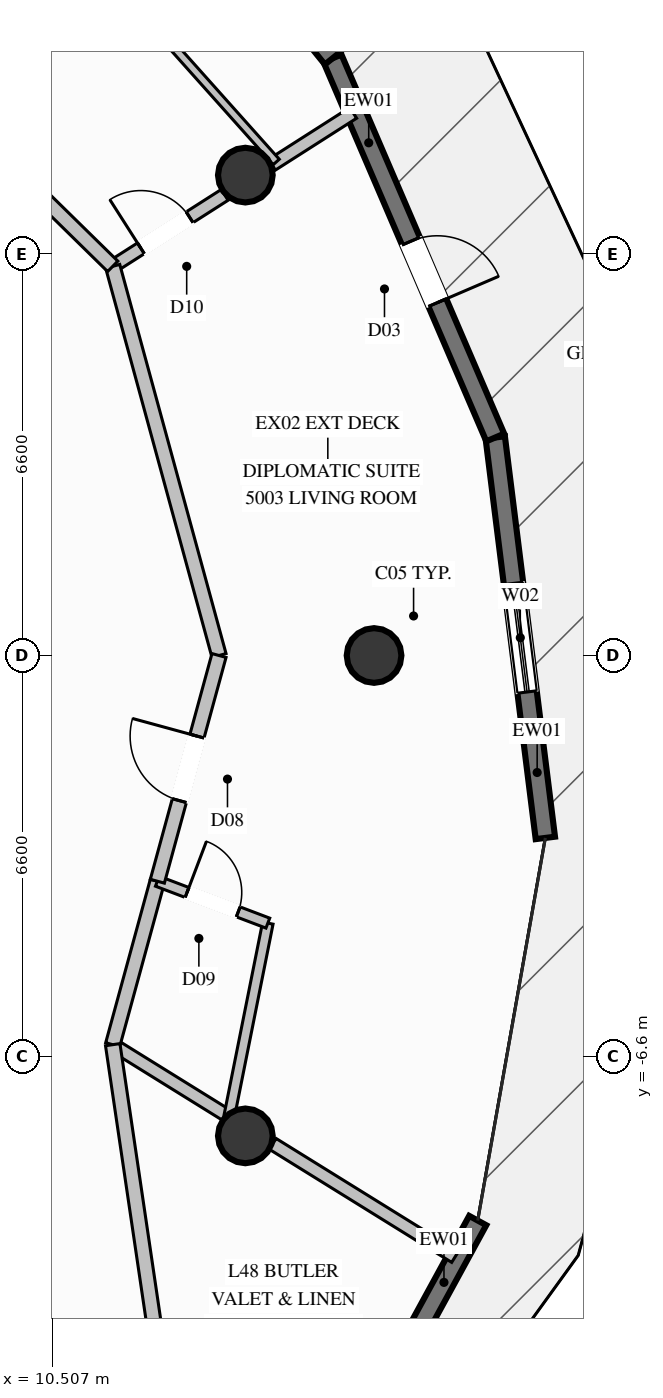
"""IFC4 building model, lengths in metres.
Left out: names, types, materials, properties, quantities, classifications, styles, units other than length and angle.
Written with IfcOpenShell. Run it as: python <this file> out.ifc"""

import sys

from ifc_helpers import new_model, si_unit, direction, frame, frame_2d, origin, origin_2d, place, context, subcontext, project, spatial, rectangle, circle, extrude, element, fill, save


model = new_model("IFC4")
c1 = context("Model", 3, precision=1e-05, world=origin(), true_north=direction((0.0, 1.0)))
c2 = subcontext(c1, "Body", "Model", "MODEL_VIEW")
j1 = project(units=[si_unit("LENGTHUNIT", "METRE"), si_unit("PLANEANGLEUNIT", "RADIAN")], contexts=[c1])
p1 = place(None, origin())
s1 = spatial("IfcSite", under=j1, at=p1, CompositionType="ELEMENT")
p2 = place(p1, origin())
s2 = spatial("IfcBuilding", under=s1, at=p2, CompositionType="ELEMENT")
p3 = place(p2, frame((0.0, 0.0, 187.6)))
s3 = spatial("IfcBuildingStorey", under=s2, at=p3, CompositionType="ELEMENT", Elevation=187.6)
for number, where, z_axis, x_axis in (
    (1, (15.8, 0.0, 0.0), (0.0, 0.0, 1.0), (1.0, 0.0, 0.0)),
    (2, (13.683, 7.9, 0.0), (0.0, 0.0, 1.0), (1.0, 0.0, 0.0)),
    (3, (13.683, -7.9, 0.0), (0.0, 0.0, 1.0), (1.0, 0.0, 0.0)),
):
    element("IfcColumn", number, at=place(p3, frame(where, z_axis=z_axis, x_axis=x_axis)), inside=s3, PredefinedType="COLUMN", context=c2, shape_type="SweptSolid", body=[
        extrude(circle(Radius=0.45, at=origin_2d()), origin(), (0.0, 0.0, 1.0), 3.6),
    ])
p4 = place(p3, frame((17.505, -9.292, 0.0), z_axis=(0.0, 0.0, 1.0), x_axis=(-0.479142226632, -0.877737276557, 0.0)))
e4 = element("IfcWall", 4, at=p4, inside=s3, PredefinedType="SOLIDWALL", context=c2, shape_type="SweptSolid", body=[
    extrude(rectangle(XDim=6.132, YDim=0.32, at=frame_2d((3.066, 0.0))), origin(), (0.0, 0.0, 1.0), 3.36),
])
p5 = place(p4, frame((2.568, 0.0, 0.35)))
e5 = element("IfcOpeningElement", 5, at=p5, cuts=e4, PredefinedType="OPENING", context=c2, shape_type="SweptSolid", body=[
    extrude(rectangle(XDim=1.8, YDim=2.6, at=frame_2d((0.9, 1.3))), frame((0.0, 0.17, 0.0), z_axis=(0.0, -1.0, 0.0), x_axis=(1.0, 0.0, 0.0)), (0.0, 0.0, 1.0), 0.34),
])
p6 = place(p3, frame((17.793, 3.585, 0.0), z_axis=(0.0, 0.0, 1.0), x_axis=(0.12416151274, -0.992262021219, 0.0)))
e6 = element("IfcWall", 6, at=p6, inside=s3, PredefinedType="SOLIDWALL", context=c2, shape_type="SweptSolid", body=[
    extrude(rectangle(XDim=6.636, YDim=0.32, at=frame_2d((3.318, 0.0))), origin(), (0.0, 0.0, 1.0), 3.36),
])
p7 = place(p6, frame((2.418, 0.0, 0.35)))
e7 = element("IfcOpeningElement", 7, at=p7, cuts=e6, PredefinedType="OPENING", context=c2, shape_type="SweptSolid", body=[
    extrude(rectangle(XDim=1.8, YDim=2.6, at=frame_2d((0.9, 1.3))), frame((0.0, 0.17, 0.0), z_axis=(0.0, -1.0, 0.0), x_axis=(1.0, 0.0, 0.0)), (0.0, 0.0, 1.0), 0.34),
])
p8 = place(p3, frame((15.116, 9.82, 0.0), z_axis=(0.0, 0.0, 1.0), x_axis=(0.394518464568, -0.91888801337, 0.0)))
e8 = element("IfcWall", 8, at=p8, inside=s3, PredefinedType="SOLIDWALL", context=c2, shape_type="SweptSolid", body=[
    extrude(rectangle(XDim=6.785, YDim=0.32, at=frame_2d((3.393, 0.0))), origin(), (0.0, 0.0, 1.0), 3.36),
])
p9 = place(p8, frame((3.272, 0.0, 0.0)))
e9 = element("IfcOpeningElement", 9, at=p9, cuts=e8, PredefinedType="OPENING", context=c2, shape_type="SweptSolid", body=[
    extrude(rectangle(XDim=1.1, YDim=2.2, at=frame_2d((0.55, 1.1))), frame((0.0, 0.17, 0.0), z_axis=(0.0, -1.0, 0.0), x_axis=(1.0, 0.0, 0.0)), (0.0, 0.0, 1.0), 0.34),
])
p10 = place(p3, frame((10.846, 15.093, 0.0), z_axis=(0.0, 0.0, 1.0), x_axis=(0.629326572603, -0.777140955693, 0.0)))
e10 = element("IfcWall", 10, at=p10, inside=s3, PredefinedType="SOLIDWALL", context=c2, shape_type="SweptSolid", body=[
    extrude(rectangle(XDim=6.785, YDim=0.32, at=frame_2d((3.393, 0.0))), origin(), (0.0, 0.0, 1.0), 3.36),
])
p11 = place(p10, frame((2.493, 0.0, 0.35)))
e11 = element("IfcOpeningElement", 11, at=p11, cuts=e10, PredefinedType="OPENING", context=c2, shape_type="SweptSolid", body=[
    extrude(rectangle(XDim=1.8, YDim=2.6, at=frame_2d((0.9, 1.3))), frame((0.0, 0.17, 0.0), z_axis=(0.0, -1.0, 0.0), x_axis=(1.0, 0.0, 0.0)), (0.0, 0.0, 1.0), 0.34),
])
p12 = place(p3, frame((11.502, 6.4, 0.0), z_axis=(0.0, 0.0, 1.0), x_axis=(0.842942702802, 0.538003345522, 0.0)))
e12 = element("IfcWall", 12, at=p12, inside=s3, PredefinedType="PARTITIONING", context=c2, shape_type="SweptSolid", body=[
    extrude(rectangle(XDim=2.184, YDim=0.21, at=frame_2d((1.092, 0.0))), origin(), (0.0, 0.0, 1.0), 2.801),
])
p13 = place(p12, frame((0.55, 0.0, 0.0)))
e13 = element("IfcOpeningElement", 13, at=p13, cuts=e12, PredefinedType="OPENING", context=c2, shape_type="SweptSolid", body=[
    extrude(rectangle(XDim=0.95, YDim=2.1, at=frame_2d((0.475, 1.05))), frame((0.0, 0.115, 0.0), z_axis=(0.0, -1.0, 0.0), x_axis=(1.0, 0.0, 0.0)), (0.0, 0.0, 1.0), 0.23),
])
p14 = place(p3, frame((14.121, 8.071, 0.0), z_axis=(0.0, 0.0, 1.0), x_axis=(0.842835995137, 0.538170498357, 0.0)))
e14 = element("IfcWall", 14, at=p14, inside=s3, PredefinedType="PARTITIONING", context=c2, shape_type="SweptSolid", body=[
    extrude(rectangle(XDim=1.585, YDim=0.21, at=frame_2d((0.792, 0.0))), origin(), (0.0, 0.0, 1.0), 3.36),
])
p15 = place(p3, frame((11.502, -6.4, 0.0), z_axis=(0.0, 0.0, 1.0), x_axis=(0.849789901528, -0.527121545054, 0.0)))
e15 = element("IfcWall", 15, at=p15, inside=s3, PredefinedType="PARTITIONING", context=c2, shape_type="SweptSolid", body=[
    extrude(rectangle(XDim=2.191, YDim=0.21, at=frame_2d((1.096, 0.0))), origin(), (0.0, 0.0, 1.0), 2.801),
])
p16 = place(p3, frame((14.134, -8.032, 0.0), z_axis=(0.0, 0.0, 1.0), x_axis=(0.849859297118, -0.527009653709, 0.0)))
e16 = element("IfcWall", 16, at=p16, inside=s3, PredefinedType="PARTITIONING", context=c2, shape_type="SweptSolid", body=[
    extrude(rectangle(XDim=3.528, YDim=0.21, at=frame_2d((1.764, 0.0))), origin(), (0.0, 0.0, 1.0), 3.36),
])
p17 = place(p3, frame((11.502, -6.4, 0.0), z_axis=(0.0, 0.0, 1.0), x_axis=(0.263465836707, 0.964668727019, 0.0)))
e17 = element("IfcWall", 17, at=p17, inside=s3, PredefinedType="PARTITIONING", context=c2, shape_type="SweptSolid", body=[
    extrude(rectangle(XDim=2.786, YDim=0.24, at=frame_2d((1.393, 0.0))), origin(), (0.0, 0.0, 1.0), 3.36),
])
p18 = place(p3, frame((13.416, -7.587, 0.0), z_axis=(0.0, 0.0, 1.0), x_axis=(0.19604388327, 0.980595123296, 0.0)))
e18 = element("IfcWall", 18, at=p18, inside=s3, PredefinedType="PLUMBINGWALL", context=c2, shape_type="SweptSolid", body=[
    extrude(rectangle(XDim=3.249, YDim=0.175, at=frame_2d((1.625, 0.0))), origin(), (0.0, 0.0, 1.0), 2.929),
])
p19 = place(p3, frame((12.236, -3.712, 0.0), z_axis=(0.0, 0.0, 1.0), x_axis=(0.935032001773, -0.35456333096, 0.0)))
e19 = element("IfcWall", 19, at=p19, inside=s3, PredefinedType="PLUMBINGWALL", context=c2, shape_type="SweptSolid", body=[
    extrude(rectangle(XDim=1.943, YDim=0.175, at=frame_2d((0.972, 0.0))), origin(), (0.0, 0.0, 1.0), 3.36),
])
p20 = place(p19, frame((0.522, 0.0, 0.0)))
e20 = element("IfcOpeningElement", 20, at=p20, cuts=e19, PredefinedType="OPENING", context=c2, shape_type="SweptSolid", body=[
    extrude(rectangle(XDim=0.9, YDim=2.1, at=frame_2d((0.45, 1.05))), frame((0.0, 0.098, 0.0), z_axis=(0.0, -1.0, 0.0), x_axis=(1.0, 0.0, 0.0)), (0.0, 0.0, 1.0), 0.195),
])
p21 = place(p3, frame((13.25, 0.0, 0.0), z_axis=(0.0, 0.0, 1.0), x_axis=(-0.263484816116, 0.96466354325, 0.0)))
e21 = element("IfcWall", 21, at=p21, inside=s3, PredefinedType="PARTITIONING", context=c2, shape_type="SweptSolid", body=[
    extrude(rectangle(XDim=6.634, YDim=0.24, at=frame_2d((3.317, 0.0))), origin(), (0.0, 0.0, 1.0), 3.36),
])
p22 = place(p3, frame((12.236, -3.712, 0.0), z_axis=(0.0, 0.0, 1.0), x_axis=(0.263498559894, 0.964659789218, 0.0)))
e22 = element("IfcWall", 22, at=p22, inside=s3, PredefinedType="PARTITIONING", context=c2, shape_type="SweptSolid", body=[
    extrude(rectangle(XDim=3.848, YDim=0.24, at=frame_2d((1.924, 0.0))), origin(), (0.0, 0.0, 1.0), 3.36),
])
p23 = place(p22, frame((1.374, 0.0, 0.0)))
e23 = element("IfcOpeningElement", 23, at=p23, cuts=e22, PredefinedType="OPENING", context=c2, shape_type="SweptSolid", body=[
    extrude(rectangle(XDim=1.1, YDim=2.3, at=frame_2d((0.55, 1.15))), frame((0.0, 0.13, 0.0), z_axis=(0.0, -1.0, 0.0), x_axis=(1.0, 0.0, 0.0)), (0.0, 0.0, 1.0), 0.26),
])
p24 = place(p3, frame((11.502, 6.4, 0.0), z_axis=(0.0, 0.0, 1.0), x_axis=(-0.713933337596, 0.700213674152, 0.0)))
e24 = element("IfcWall", 24, at=p24, inside=s3, PredefinedType="PARTITIONING", context=c2, shape_type="SweptSolid", body=[
    extrude(rectangle(XDim=6.691, YDim=0.24, at=frame_2d((3.345, 0.0))), origin(), (0.0, 0.0, 1.0), 3.36),
])
p25 = place(p3, frame((14.191, 8.116, 0.0), z_axis=(0.0, 0.0, 1.0), x_axis=(-0.666313460935, 0.745671758736, 0.0)))
e25 = element("IfcWall", 25, at=p25, inside=s3, PredefinedType="PARTITIONING", context=c2, shape_type="SweptSolid", body=[
    extrude(rectangle(XDim=8.571, YDim=0.135, at=frame_2d((4.286, 0.0))), origin(), (0.0, 0.0, 1.0), 2.929),
])
p26 = place(p25, frame((3.81, 0.0, 0.0)))
e26 = element("IfcOpeningElement", 26, at=p26, cuts=e25, PredefinedType="OPENING", context=c2, shape_type="SweptSolid", body=[
    extrude(rectangle(XDim=0.95, YDim=2.1, at=frame_2d((0.475, 1.05))), frame((0.0, 0.078, 0.0), z_axis=(0.0, -1.0, 0.0), x_axis=(1.0, 0.0, 0.0)), (0.0, 0.0, 1.0), 0.155),
])
p27 = place(p3, frame((12.3, -11.8, 0.0), z_axis=(0.0, 0.0, 1.0), x_axis=(-0.146203405363, 0.98925454978, 0.0)))
e27 = element("IfcWall", 27, at=p27, inside=s3, PredefinedType="PARTITIONING", context=c2, shape_type="SweptSolid", body=[
    extrude(rectangle(XDim=5.459, YDim=0.24, at=frame_2d((2.729, 0.0))), origin(), (0.0, 0.0, 1.0), 3.36),
])
p28 = place(p7, origin())
e28 = element("IfcWindow", 28, at=p28, inside=s3, PartitioningType="SINGLE_PANEL", PredefinedType="WINDOW", context=c2, shape_type="SweptSolid", body=[
    extrude(rectangle(XDim=1.8, YDim=2.6, at=frame_2d((0.9, 1.3))), frame((0.0, 0.03, 0.0), z_axis=(0.0, -1.0, 0.0), x_axis=(1.0, 0.0, 0.0)), (0.0, 0.0, 1.0), 0.06),
])
fill(e7, e28)
p29 = place(p9, origin())
e29 = element("IfcDoor", 29, at=p29, inside=s3, OperationType="SINGLE_SWING_RIGHT", PredefinedType="DOOR", context=c2, shape_type="SweptSolid", body=[
    extrude(rectangle(XDim=1.1, YDim=2.2, at=frame_2d((0.55, 1.1))), frame((0.0, 0.025, 0.0), z_axis=(0.0, -1.0, 0.0), x_axis=(1.0, 0.0, 0.0)), (0.0, 0.0, 1.0), 0.05),
])
fill(e9, e29)
p30 = place(p20, origin())
e30 = element("IfcDoor", 30, at=p30, inside=s3, OperationType="SINGLE_SWING_LEFT", PredefinedType="DOOR", context=c2, shape_type="SweptSolid", body=[
    extrude(rectangle(XDim=0.9, YDim=2.1, at=frame_2d((0.45, 1.05))), frame((0.0, 0.025, 0.0), z_axis=(0.0, -1.0, 0.0), x_axis=(1.0, 0.0, 0.0)), (0.0, 0.0, 1.0), 0.05),
])
fill(e20, e30)
p31 = place(p23, origin())
e31 = element("IfcDoor", 31, at=p31, inside=s3, OperationType="SINGLE_SWING_RIGHT", PredefinedType="DOOR", context=c2, shape_type="SweptSolid", body=[
    extrude(rectangle(XDim=1.1, YDim=2.3, at=frame_2d((0.55, 1.15))), frame((0.0, 0.025, 0.0), z_axis=(0.0, -1.0, 0.0), x_axis=(1.0, 0.0, 0.0)), (0.0, 0.0, 1.0), 0.05),
])
fill(e23, e31)
p32 = place(p13, origin())
e32 = element("IfcDoor", 32, at=p32, inside=s3, OperationType="SINGLE_SWING_LEFT", PredefinedType="DOOR", context=c2, shape_type="SweptSolid", body=[
    extrude(rectangle(XDim=0.95, YDim=2.1, at=frame_2d((0.475, 1.05))), frame((0.0, 0.025, 0.0), z_axis=(0.0, -1.0, 0.0), x_axis=(1.0, 0.0, 0.0)), (0.0, 0.0, 1.0), 0.05),
])
fill(e13, e32)
save(model, sys.argv[1])
